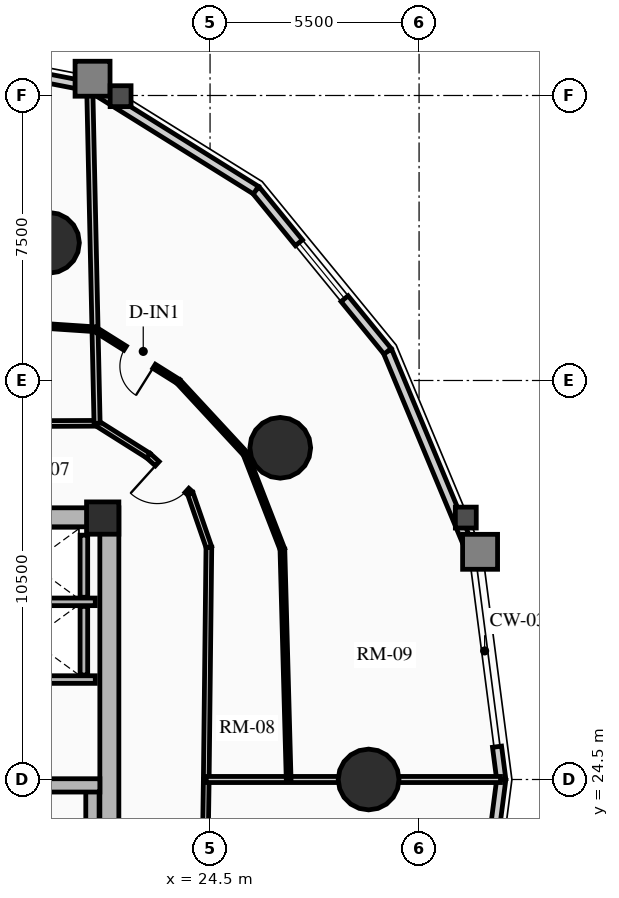
"""IFC4 building model, lengths in metres.
Left out: names, types, materials, properties, quantities, classifications, styles, units other than length and angle.
Written with IfcOpenShell. Run it as: python <this file> out.ifc"""

import sys

from ifc_helpers import new_model, si_unit, direction, frame, frame_2d, origin, origin_2d, place, context, subcontext, project, spatial, rectangle, circle, extrude, source, transform, mapped, element, fill, save


model = new_model("IFC4")
c1 = context("Model", 3, precision=1e-05, world=origin(), true_north=direction((0.0, 1.0)))
c2 = subcontext(c1, "Body", "Model", "MODEL_VIEW")
j1 = project(units=[si_unit("LENGTHUNIT", "METRE"), si_unit("PLANEANGLEUNIT", "RADIAN")], contexts=[c1])
p1 = place(None, origin())
s1 = spatial("IfcSite", under=j1, at=p1, CompositionType="ELEMENT")
p2 = place(p1, origin())
s2 = spatial("IfcBuilding", under=s1, at=p2, CompositionType="ELEMENT")
p3 = place(p2, frame((0.0, 0.0, 56.92)))
s3 = spatial("IfcBuildingStorey", under=s2, at=p3, CompositionType="ELEMENT", Elevation=56.92)
p4 = place(p3, frame((21.85, 17.35, 0.0), z_axis=(0.0, 0.0, 1.0), x_axis=(0.0, 1.0, 0.0)))
e1 = element("IfcWall", 1, at=p4, inside=s3, PredefinedType="SHEAR", context=c2, shape_type="SweptSolid", body=[
    extrude(rectangle(XDim=14.3, YDim=0.5, at=frame_2d((7.15, 0.0))), origin(), (0.0, 0.0, 1.0), 2.91),
])
p5 = place(p3, frame((11.15, 31.4, 0.0), z_axis=(0.0, 0.0, 1.0), x_axis=(1.0, 0.0, 0.0)))
e2 = element("IfcWall", 2, at=p5, inside=s3, PredefinedType="SHEAR", context=c2, shape_type="SweptSolid", body=[
    extrude(rectangle(XDim=10.7, YDim=0.5, at=frame_2d((5.35, 0.0))), origin(), (0.0, 0.0, 1.0), 2.91),
])
m1 = source(origin(), c2, "Body", "SweptSolid", [
    extrude(rectangle(XDim=1.5, YDim=2.02, at=frame_2d((0.75, 1.01))), frame((0.0, 0.26, 0.0), z_axis=(0.0, -1.0, 0.0), x_axis=(1.0, 0.0, 0.0)), (0.0, 0.0, 1.0), 0.52),
])
p6 = place(p5, frame((4.6, 0.0, 0.0)))
e3 = element("IfcOpeningElement", 3, at=p6, cuts=e2, PredefinedType="OPENING", context=c2, shape_type="MappedRepresentation", body=[
    mapped(m1, transform((0.0, 0.0, 0.0), x_axis=(1.0, 0.0, 0.0), y_axis=(0.0, 1.0, 0.0), z_axis=(0.0, 0.0, 1.0), scale=1.0)),
])
p7 = place(p3, frame((21.405, 17.6, 0.0), z_axis=(0.0, 0.0, 1.0), x_axis=(0.0, 1.0, 0.0)))
e4 = element("IfcWall", 4, at=p7, inside=s3, PredefinedType="SHEAR", context=c2, shape_type="SweptSolid", body=[
    extrude(rectangle(XDim=6.745, YDim=0.35, at=frame_2d((3.373, 0.0))), origin(), (0.0, 0.0, 1.0), 2.91),
])
p8 = place(p3, frame((18.315, 24.345, 0.0), z_axis=(0.0, 0.0, 1.0), x_axis=(1.0, 0.0, 0.0)))
e5 = element("IfcWall", 5, at=p8, inside=s3, PredefinedType="SHEAR", context=c2, shape_type="SweptSolid", body=[
    extrude(rectangle(XDim=3.285, YDim=0.35, at=frame_2d((1.643, 0.0))), origin(), (0.0, 0.0, 1.0), 2.91),
])
p9 = place(p3, frame((21.675, 31.38, 0.0), z_axis=(0.0, 0.0, 1.0), x_axis=(1.0, 0.0, 0.0)))
e6 = element("IfcColumn", 6, at=p9, inside=s3, PredefinedType="COLUMN", context=c2, shape_type="SweptSolid", body=[
    extrude(rectangle(XDim=0.85, YDim=0.85, at=origin_2d()), origin(), (0.0, 0.0, 1.0), 2.91),
])
for number, where, z_axis, x_axis in (
    (7, (28.672, 24.5, 0.0), (0.0, 0.0, 1.0), (1.0, 0.0, 0.0)),
    (8, (26.347, 33.229, 0.0), (0.0, 0.0, 1.0), (1.0, 0.0, 0.0)),
    (9, (20.261, 38.623, 0.0), (0.0, 0.0, 1.0), (1.0, 0.0, 0.0)),
):
    element("IfcColumn", number, at=place(p3, frame(where, z_axis=z_axis, x_axis=x_axis)), inside=s3, PredefinedType="USERDEFINED", context=c2, shape_type="SweptSolid", body=[
        extrude(circle(Radius=0.8, at=origin_2d()), origin(), (0.0, 0.0, 1.0), 2.91),
    ])
p10 = place(p3, frame((32.051, 25.363, 0.0), z_axis=(0.0, 0.0, 1.0), x_axis=(0.128523364007, -0.991706481225, 0.0)))
e10 = element("IfcWall", 10, at=p10, inside=s3, PredefinedType="SOLIDWALL", context=c2, shape_type="SweptSolid", body=[
    extrude(rectangle(XDim=0.87, YDim=0.24, at=frame_2d((0.435, 0.0))), origin(), (0.0, 0.0, 1.0), 2.635),
])
p11 = place(p3, frame((29.172, 35.768, 0.0), z_axis=(0.0, 0.0, 1.0), x_axis=(0.384348836956, -0.923187939442, 0.0)))
e11 = element("IfcWall", 11, at=p11, inside=s3, PredefinedType="SOLIDWALL", context=c2, shape_type="SweptSolid", body=[
    extrude(rectangle(XDim=5.789, YDim=0.24, at=frame_2d((2.894, 0.0))), origin(), (0.0, 0.0, 1.0), 2.073),
])
p12 = place(p3, frame((25.707, 40.009, 0.0), z_axis=(0.0, 0.0, 1.0), x_axis=(0.632713287022, -0.77438614168, 0.0)))
e12 = element("IfcWall", 12, at=p12, inside=s3, PredefinedType="SOLIDWALL", context=c2, shape_type="SweptSolid", body=[
    extrude(rectangle(XDim=5.477, YDim=0.24, at=frame_2d((2.738, 0.0))), origin(), (0.0, 0.0, 1.0), 2.073),
])
m2 = source(origin(), c2, "Body", "SweptSolid", [
    extrude(rectangle(XDim=1.9, YDim=1.35, at=frame_2d((0.95, 0.675))), frame((0.0, 0.13, 0.0), z_axis=(0.0, -1.0, 0.0), x_axis=(1.0, 0.0, 0.0)), (0.0, 0.0, 1.0), 0.26),
])
p13 = place(p12, frame((1.788, 0.0, 0.65)))
e13 = element("IfcOpeningElement", 13, at=p13, cuts=e12, PredefinedType="OPENING", context=c2, shape_type="MappedRepresentation", body=[
    mapped(m2, transform((0.0, 0.0, 0.0), x_axis=(1.0, 0.0, 0.0), y_axis=(0.0, 1.0, 0.0), z_axis=(0.0, 0.0, 1.0), scale=1.0)),
])
p14 = place(p3, frame((21.34, 42.732, 0.0), z_axis=(0.0, 0.0, 1.0), x_axis=(0.848533613342, -0.529141481107, 0.0)))
e14 = element("IfcWall", 14, at=p14, inside=s3, PredefinedType="SOLIDWALL", context=c2, shape_type="SweptSolid", body=[
    extrude(rectangle(XDim=5.146, YDim=0.24, at=frame_2d((2.573, 0.0))), origin(), (0.0, 0.0, 1.0), 2.073),
])
p15 = place(p3, frame((16.5, 43.67, 0.0), z_axis=(0.0, 0.0, 1.0), x_axis=(0.981725274071, -0.190303668512, 0.0)))
e15 = element("IfcWall", 15, at=p15, inside=s3, PredefinedType="SOLIDWALL", context=c2, shape_type="SweptSolid", body=[
    extrude(rectangle(XDim=4.93, YDim=0.24, at=frame_2d((2.465, 0.0))), origin(), (0.0, 0.0, 1.0), 2.073),
])
m3 = source(origin(), c2, "Body", "SweptSolid", [
    extrude(rectangle(XDim=2.2, YDim=1.35, at=frame_2d((1.1, 0.675))), frame((0.0, 0.13, 0.0), z_axis=(0.0, -1.0, 0.0), x_axis=(1.0, 0.0, 0.0)), (0.0, 0.0, 1.0), 0.26),
])
p16 = place(p15, frame((1.365, 0.0, 0.65)))
e16 = element("IfcOpeningElement", 16, at=p16, cuts=e15, PredefinedType="OPENING", context=c2, shape_type="MappedRepresentation", body=[
    mapped(m3, transform((0.0, 0.0, 0.0), x_axis=(1.0, 0.0, 0.0), y_axis=(0.0, 1.0, 0.0), z_axis=(0.0, 0.0, 1.0), scale=1.0)),
])
p17 = place(p3, frame((32.163, 24.5, 0.0), z_axis=(0.0, 0.0, 1.0), x_axis=(-0.128339641463, -0.991730274031, 0.0)))
e17 = element("IfcWall", 17, at=p17, inside=s3, PredefinedType="SOLIDWALL", context=c2, shape_type="SweptSolid", body=[
    extrude(rectangle(XDim=5.973, YDim=0.24, at=frame_2d((2.987, 0.0))), origin(), (0.0, 0.0, 1.0), 2.073),
])
p18 = place(p17, frame((1.887, 0.0, 0.65)))
e18 = element("IfcOpeningElement", 18, at=p18, cuts=e17, PredefinedType="OPENING", context=c2, shape_type="MappedRepresentation", body=[
    mapped(m3, transform((0.0, 0.0, 0.0), x_axis=(1.0, 0.0, 0.0), y_axis=(0.0, 1.0, 0.0), z_axis=(0.0, 0.0, 1.0), scale=1.0)),
])
for number, where, z_axis, x_axis in (
    (19, (18.51, 27.13, 0.0), (0.0, 0.0, 1.0), (1.0, 0.0, 0.0)),
    (20, (18.51, 29.175, 0.0), (0.0, 0.0, 1.0), (1.0, 0.0, 0.0)),
):
    element("IfcWall", number, at=place(p3, frame(where, z_axis=z_axis, x_axis=x_axis)), inside=s3, PredefinedType="SHEAR", context=c2, shape_type="SweptSolid", body=[
        extrude(rectangle(XDim=2.97, YDim=0.2, at=frame_2d((1.485, 0.0))), origin(), (0.0, 0.0, 1.0), 2.91),
    ])
p19 = place(p3, frame((21.18, 27.25, 0.0), z_axis=(0.0, 0.0, 1.0), x_axis=(0.0, 1.0, 0.0)))
e21 = element("IfcWall", 21, at=p19, inside=s3, PredefinedType="SHEAR", context=c2, shape_type="SweptSolid", body=[
    extrude(rectangle(XDim=1.805, YDim=0.2, at=frame_2d((0.902, 0.0))), origin(), (0.0, 0.0, 1.0), 2.91),
])
p20 = place(p3, frame((21.18, 29.295, 0.0), z_axis=(0.0, 0.0, 1.0), x_axis=(0.0, 1.0, 0.0)))
e22 = element("IfcWall", 22, at=p20, inside=s3, PredefinedType="SHEAR", context=c2, shape_type="SweptSolid", body=[
    extrude(rectangle(XDim=1.635, YDim=0.2, at=frame_2d((0.817, 0.0))), origin(), (0.0, 0.0, 1.0), 2.91),
])
p21 = place(p3, frame((24.4, 24.5, 0.0), z_axis=(0.0, 0.0, 1.0), x_axis=(0.011299841544, 0.999936154752, 0.0)))
e23 = element("IfcWall", 23, at=p21, inside=s3, PredefinedType="PARTITIONING", context=c2, shape_type="SweptSolid", body=[
    extrude(rectangle(XDim=6.115, YDim=0.15, at=frame_2d((3.057, 0.0))), origin(), (0.0, 0.0, 1.0), 2.159),
])
p22 = place(p3, frame((24.469, 30.614, 0.0), z_axis=(0.0, 0.0, 1.0), x_axis=(-0.327228335485, 0.944945298129, 0.0)))
e24 = element("IfcWall", 24, at=p22, inside=s3, PredefinedType="PARTITIONING", context=c2, shape_type="SweptSolid", body=[
    extrude(rectangle(XDim=1.495, YDim=0.15, at=frame_2d((0.748, 0.0))), origin(), (0.0, 0.0, 1.0), 2.205),
])
p23 = place(p3, frame((23.98, 32.027, 0.0), z_axis=(0.0, 0.0, 1.0), x_axis=(-0.742353224332, 0.670008724065, 0.0)))
e25 = element("IfcWall", 25, at=p23, inside=s3, PredefinedType="PARTITIONING", context=c2, shape_type="SweptSolid", body=[
    extrude(rectangle(XDim=1.485, YDim=0.15, at=frame_2d((0.742, 0.0))), origin(), (0.0, 0.0, 1.0), 2.159),
])
m4 = source(origin(), c2, "Body", "SweptSolid", [
    extrude(rectangle(XDim=1.05, YDim=2.015, at=frame_2d((0.525, 1.007))), frame((0.0, 0.085, 0.0), z_axis=(0.0, -1.0, 0.0), x_axis=(1.0, 0.0, 0.0)), (0.0, 0.0, 1.0), 0.17),
])
p24 = place(p23, frame((0.12, 0.0, 0.0)))
e26 = element("IfcOpeningElement", 26, at=p24, cuts=e25, PredefinedType="OPENING", context=c2, shape_type="MappedRepresentation", body=[
    mapped(m4, transform((0.0, 0.0, 0.0), x_axis=(1.0, 0.0, 0.0), y_axis=(0.0, 1.0, 0.0), z_axis=(0.0, 0.0, 1.0), scale=1.0)),
])
p25 = place(p3, frame((22.877, 33.022, 0.0), z_axis=(0.0, 0.0, 1.0), x_axis=(-0.845895608855, 0.533348496689, 0.0)))
e27 = element("IfcWall", 27, at=p25, inside=s3, PredefinedType="PARTITIONING", context=c2, shape_type="SweptSolid", body=[
    extrude(rectangle(XDim=1.597, YDim=0.15, at=frame_2d((0.798, 0.0))), origin(), (0.0, 0.0, 1.0), 2.205),
])
p26 = place(p3, frame((21.527, 33.873, 0.0), z_axis=(0.0, 0.0, 1.0), x_axis=(-0.999991838845, -0.004040079574, 0.0)))
e28 = element("IfcWall", 28, at=p26, inside=s3, PredefinedType="PARTITIONING", context=c2, shape_type="SweptSolid", body=[
    extrude(rectangle(XDim=3.384, YDim=0.15, at=frame_2d((1.692, 0.0))), origin(), (0.0, 0.0, 1.0), 2.159),
])
p27 = place(p3, frame((24.313, 18.496, 0.0), z_axis=(0.0, 0.0, 1.0), x_axis=(0.014394019188, 0.999896400739, 0.0)))
e29 = element("IfcWall", 29, at=p27, inside=s3, PredefinedType="PARTITIONING", context=c2, shape_type="SweptSolid", body=[
    extrude(rectangle(XDim=6.004, YDim=0.15, at=frame_2d((3.002, 0.0))), origin(), (0.0, 0.0, 1.0), 2.635),
])
m5 = source(origin(), c2, "Body", "SweptSolid", [
    extrude(rectangle(XDim=1.0, YDim=2.015, at=frame_2d((0.5, 1.007))), frame((0.0, 0.085, 0.0), z_axis=(0.0, -1.0, 0.0), x_axis=(1.0, 0.0, 0.0)), (0.0, 0.0, 1.0), 0.17),
])
p28 = place(p27, frame((2.502, 0.0, 0.0)))
e30 = element("IfcOpeningElement", 30, at=p28, cuts=e29, PredefinedType="OPENING", context=c2, shape_type="MappedRepresentation", body=[
    mapped(m5, transform((0.0, 0.0, 0.0), x_axis=(1.0, 0.0, 0.0), y_axis=(0.0, 1.0, 0.0), z_axis=(0.0, 0.0, 1.0), scale=1.0)),
])
p29 = place(p3, frame((24.4, 24.5, 0.0), z_axis=(0.0, 0.0, 1.0), x_axis=(1.0, 0.0, 0.0)))
e31 = element("IfcWall", 31, at=p29, inside=s3, PredefinedType="PARTITIONING", context=c2, shape_type="SweptSolid", body=[
    extrude(rectangle(XDim=7.743, YDim=0.16, at=frame_2d((3.872, 0.0))), origin(), (0.0, 0.0, 1.0), 2.073),
])
p30 = place(p3, frame((21.527, 33.873, 0.0), z_axis=(0.0, 0.0, 1.0), x_axis=(-0.021814395676, 0.999762037758, 0.0)))
e32 = element("IfcWall", 32, at=p30, inside=s3, PredefinedType="PARTITIONING", context=c2, shape_type="SweptSolid", body=[
    extrude(rectangle(XDim=8.842, YDim=0.16, at=frame_2d((4.421, 0.0))), origin(), (0.0, 0.0, 1.0), 2.073),
])
p31 = place(p3, frame((26.568, 24.5, 0.0), z_axis=(0.0, 0.0, 1.0), x_axis=(-0.027187947422, 0.999630339433, 0.0)))
e33 = element("IfcWall", 33, at=p31, inside=s3, PredefinedType="PARTITIONING", context=c2, shape_type="SweptSolid", body=[
    extrude(rectangle(XDim=6.061, YDim=0.125, at=frame_2d((3.031, 0.0))), origin(), (0.0, 0.0, 1.0), 2.159),
])
p32 = place(p3, frame((26.403, 30.559, 0.0), z_axis=(0.0, 0.0, 1.0), x_axis=(-0.361637165216, 0.932318915787, 0.0)))
e34 = element("IfcWall", 34, at=p32, inside=s3, PredefinedType="PARTITIONING", context=c2, shape_type="SweptSolid", body=[
    extrude(rectangle(XDim=2.694, YDim=0.125, at=frame_2d((1.347, 0.0))), origin(), (0.0, 0.0, 1.0), 2.159),
])
p33 = place(p3, frame((25.429, 33.071, 0.0), z_axis=(0.0, 0.0, 1.0), x_axis=(-0.679623863187, 0.733560770889, 0.0)))
e35 = element("IfcWall", 35, at=p33, inside=s3, PredefinedType="PARTITIONING", context=c2, shape_type="SweptSolid", body=[
    extrude(rectangle(XDim=2.594, YDim=0.125, at=frame_2d((1.297, 0.0))), origin(), (0.0, 0.0, 1.0), 2.635),
])
p34 = place(p3, frame((23.666, 34.974, 0.0), z_axis=(0.0, 0.0, 1.0), x_axis=(-0.847319394731, 0.531083650014, 0.0)))
e36 = element("IfcWall", 36, at=p34, inside=s3, PredefinedType="PARTITIONING", context=c2, shape_type="SweptSolid", body=[
    extrude(rectangle(XDim=2.589, YDim=0.125, at=frame_2d((1.294, 0.0))), origin(), (0.0, 0.0, 1.0), 2.205),
])
m6 = source(origin(), c2, "Body", "SweptSolid", [
    extrude(rectangle(XDim=0.9, YDim=2.005, at=frame_2d((0.45, 1.002))), frame((0.0, 0.073, 0.0), z_axis=(0.0, -1.0, 0.0), x_axis=(1.0, 0.0, 0.0)), (0.0, 0.0, 1.0), 0.145),
])
p35 = place(p34, frame((0.754, 0.0, 0.0)))
e37 = element("IfcOpeningElement", 37, at=p35, cuts=e36, PredefinedType="OPENING", context=c2, shape_type="MappedRepresentation", body=[
    mapped(m6, transform((0.0, 0.0, 0.0), x_axis=(1.0, 0.0, 0.0), y_axis=(0.0, 1.0, 0.0), z_axis=(0.0, 0.0, 1.0), scale=1.0)),
])
p36 = place(p3, frame((21.473, 36.348, 0.0), z_axis=(0.0, 0.0, 1.0), x_axis=(-0.997789137643, 0.066459286803, 0.0)))
e38 = element("IfcWall", 38, at=p36, inside=s3, PredefinedType="PARTITIONING", context=c2, shape_type="SweptSolid", body=[
    extrude(rectangle(XDim=3.798, YDim=0.125, at=frame_2d((1.899, 0.0))), origin(), (0.0, 0.0, 1.0), 2.159),
])
m7 = source(origin(), c2, "Body", "SweptSolid", [
    extrude(rectangle(XDim=1.9, YDim=1.35, at=frame_2d((0.95, 0.675))), frame((0.0, 0.03, 0.0), z_axis=(0.0, -1.0, 0.0), x_axis=(1.0, 0.0, 0.0)), (0.0, 0.0, 1.0), 0.06),
])
p37 = place(p13, origin())
e39 = element("IfcWindow", 39, at=p37, inside=s3, PartitioningType="DOUBLE_PANEL_VERTICAL", PredefinedType="WINDOW", context=c2, shape_type="MappedRepresentation", body=[
    mapped(m7, transform((0.0, 0.0, 0.0), x_axis=(1.0, 0.0, 0.0), y_axis=(0.0, 1.0, 0.0), z_axis=(0.0, 0.0, 1.0), scale=1.0)),
])
fill(e13, e39)
m8 = source(origin(), c2, "Body", "SweptSolid", [
    extrude(rectangle(XDim=1.05, YDim=2.015, at=frame_2d((0.525, 1.007))), frame((0.0, 0.025, 0.0), z_axis=(0.0, -1.0, 0.0), x_axis=(1.0, 0.0, 0.0)), (0.0, 0.0, 1.0), 0.05),
])
p38 = place(p24, origin())
e40 = element("IfcDoor", 40, at=p38, inside=s3, OperationType="SINGLE_SWING_RIGHT", PredefinedType="DOOR", context=c2, shape_type="MappedRepresentation", body=[
    mapped(m8, transform((0.0, 0.0, 0.0), x_axis=(1.0, 0.0, 0.0), y_axis=(0.0, 1.0, 0.0), z_axis=(0.0, 0.0, 1.0), scale=1.0)),
])
fill(e26, e40)
m9 = source(origin(), c2, "Body", "SweptSolid", [
    extrude(rectangle(XDim=0.9, YDim=2.005, at=frame_2d((0.45, 1.002))), frame((0.0, 0.025, 0.0), z_axis=(0.0, -1.0, 0.0), x_axis=(1.0, 0.0, 0.0)), (0.0, 0.0, 1.0), 0.05),
])
p39 = place(p35, origin())
e41 = element("IfcDoor", 41, at=p39, inside=s3, OperationType="SINGLE_SWING_LEFT", PredefinedType="DOOR", context=c2, shape_type="MappedRepresentation", body=[
    mapped(m9, transform((0.0, 0.0, 0.0), x_axis=(1.0, 0.0, 0.0), y_axis=(0.0, 1.0, 0.0), z_axis=(0.0, 0.0, 1.0), scale=1.0)),
])
fill(e37, e41)
save(model, sys.argv[1])
